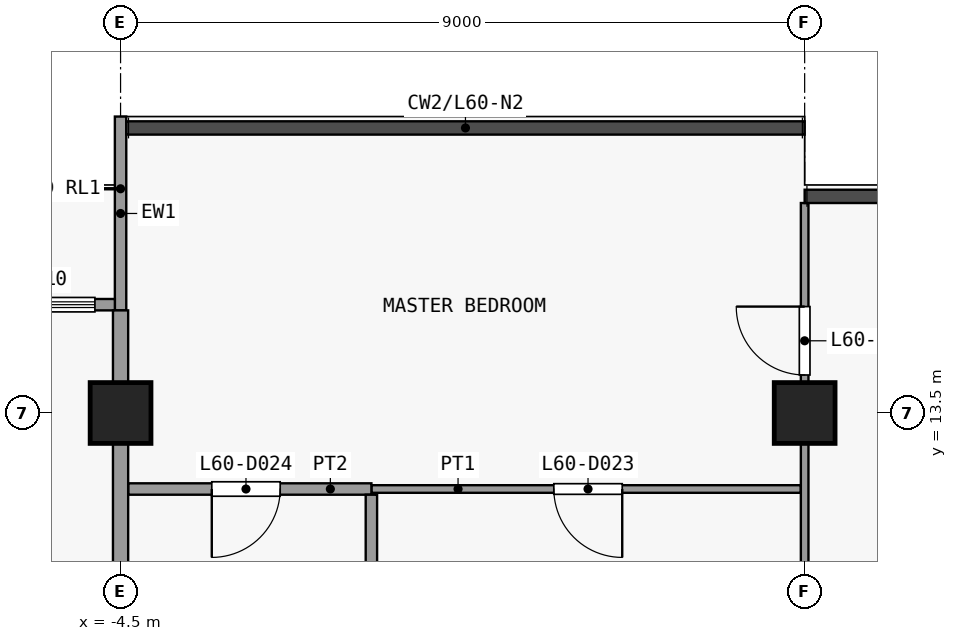
"""IFC4 building model, lengths in metres.
Left out: names, types, materials, properties, quantities, classifications, styles, units other than length and angle.
Written with IfcOpenShell. Run it as: python <this file> out.ifc"""

import sys

from ifc_helpers import new_model, si_unit, direction, frame, frame_2d, origin, origin_2d, place, context, subcontext, project, spatial, rectangle, extrude, element, fill, save


model = new_model("IFC4")
c1 = context("Model", 3, precision=1e-05, world=origin(), true_north=direction((0.0, 1.0)))
c2 = subcontext(c1, "Body", "Model", "MODEL_VIEW")
j1 = project(units=[si_unit("LENGTHUNIT", "METRE"), si_unit("PLANEANGLEUNIT", "RADIAN")], contexts=[c1])
p1 = place(None, origin())
s1 = spatial("IfcSite", under=j1, at=p1, CompositionType="ELEMENT")
p2 = place(p1, origin())
s2 = spatial("IfcBuilding", under=s1, at=p2, CompositionType="ELEMENT")
p3 = place(p2, frame((0.0, 0.0, 237.5)))
s3 = spatial("IfcBuildingStorey", under=s2, at=p3, CompositionType="ELEMENT", Elevation=237.5)
for number, where, z_axis, x_axis in (
    (1, (-4.5, 13.5, 0.0), (0.0, 0.0, 1.0), (1.0, 0.0, 0.0)),
    (2, (4.5, 13.5, 0.0), (0.0, 0.0, 1.0), (1.0, 0.0, 0.0)),
):
    element("IfcColumn", number, at=place(p3, frame(where, z_axis=z_axis, x_axis=x_axis)), inside=s3, PredefinedType="COLUMN", context=c2, shape_type="SweptSolid", body=[
        extrude(rectangle(XDim=0.8, YDim=0.8, at=origin_2d()), origin(), (0.0, 0.0, 1.0), 3.6),
    ])
p4 = place(p3, frame((-4.5, 14.85, 0.0), z_axis=(0.0, 0.0, 1.0), x_axis=(0.0, 1.0, 0.0)))
e3 = element("IfcWall", 3, at=p4, inside=s3, PredefinedType="SOLIDWALL", context=c2, shape_type="SweptSolid", body=[
    extrude(rectangle(XDim=2.55, YDim=0.15, at=frame_2d((1.275, 0.0))), origin(), (0.0, 0.0, 1.0), 3.3),
])
p5 = place(p3, frame((-10.425, 14.925, 0.0), z_axis=(0.0, 0.0, 1.0), x_axis=(1.0, 0.0, 0.0)))
e4 = element("IfcWall", 4, at=p5, inside=s3, PredefinedType="SOLIDWALL", context=c2, shape_type="SweptSolid", body=[
    extrude(rectangle(XDim=5.85, YDim=0.15, at=frame_2d((2.925, 0.0))), origin(), (0.0, 0.0, 1.0), 3.3),
])
p6 = place(p5, frame((2.325, 0.0, 0.0)))
e5 = element("IfcOpeningElement", 5, at=p6, cuts=e4, PredefinedType="OPENING", context=c2, shape_type="SweptSolid", body=[
    extrude(rectangle(XDim=1.2, YDim=2.4, at=frame_2d((0.6, 1.2))), frame((0.0, 0.085, 0.0), z_axis=(0.0, -1.0, 0.0), x_axis=(1.0, 0.0, 0.0)), (0.0, 0.0, 1.0), 0.17),
])
p7 = place(p5, frame((0.262, 0.0, 0.9)))
e6 = element("IfcOpeningElement", 6, at=p7, cuts=e4, PredefinedType="OPENING", context=c2, shape_type="SweptSolid", body=[
    extrude(rectangle(XDim=1.8, YDim=2.1, at=frame_2d((0.9, 1.05))), frame((0.0, 0.085, 0.0), z_axis=(0.0, -1.0, 0.0), x_axis=(1.0, 0.0, 0.0)), (0.0, 0.0, 1.0), 0.17),
])
p8 = place(p5, frame((3.788, 0.0, 0.9)))
e7 = element("IfcOpeningElement", 7, at=p8, cuts=e4, PredefinedType="OPENING", context=c2, shape_type="SweptSolid", body=[
    extrude(rectangle(XDim=1.8, YDim=2.1, at=frame_2d((0.9, 1.05))), frame((0.0, 0.085, 0.0), z_axis=(0.0, -1.0, 0.0), x_axis=(1.0, 0.0, 0.0)), (0.0, 0.0, 1.0), 0.17),
])
p9 = place(p3, frame((-1.2, 12.5, 0.0), z_axis=(0.0, 0.0, 1.0), x_axis=(1.0, 0.0, 0.0)))
e8 = element("IfcWall", 8, at=p9, inside=s3, PredefinedType="PARTITIONING", context=c2, shape_type="SweptSolid", body=[
    extrude(rectangle(XDim=5.65, YDim=0.1, at=frame_2d((2.825, 0.0))), origin(), (0.0, 0.0, 1.0), 3.3),
])
p10 = place(p9, frame((2.4, 0.0, 0.0)))
e9 = element("IfcOpeningElement", 9, at=p10, cuts=e8, PredefinedType="OPENING", context=c2, shape_type="SweptSolid", body=[
    extrude(rectangle(XDim=0.9, YDim=2.1, at=frame_2d((0.45, 1.05))), frame((0.0, 0.06, 0.0), z_axis=(0.0, -1.0, 0.0), x_axis=(1.0, 0.0, 0.0)), (0.0, 0.0, 1.0), 0.12),
])
p11 = place(p3, frame((-4.4, 12.5, 0.0), z_axis=(0.0, 0.0, 1.0), x_axis=(1.0, 0.0, 0.0)))
e10 = element("IfcWall", 10, at=p11, inside=s3, PredefinedType="PARTITIONING", context=c2, shape_type="SweptSolid", body=[
    extrude(rectangle(XDim=3.2, YDim=0.15, at=frame_2d((1.6, 0.0))), origin(), (0.0, 0.0, 1.0), 3.3),
])
p12 = place(p11, frame((1.1, 0.0, 0.0)))
e11 = element("IfcOpeningElement", 11, at=p12, cuts=e10, PredefinedType="OPENING", context=c2, shape_type="SweptSolid", body=[
    extrude(rectangle(XDim=0.9, YDim=2.1, at=frame_2d((0.45, 1.05))), frame((0.0, 0.085, 0.0), z_axis=(0.0, -1.0, 0.0), x_axis=(1.0, 0.0, 0.0)), (0.0, 0.0, 1.0), 0.17),
])
p13 = place(p3, frame((-4.5, 7.575, 0.0), z_axis=(0.0, 0.0, 1.0), x_axis=(0.0, 1.0, 0.0)))
e12 = element("IfcWall", 12, at=p13, inside=s3, PredefinedType="PARTITIONING", context=c2, shape_type="SweptSolid", body=[
    extrude(rectangle(XDim=7.275, YDim=0.2, at=frame_2d((3.638, 0.0))), origin(), (0.0, 0.0, 1.0), 3.3),
])
p14 = place(p3, frame((-1.2, 7.575, 0.0), z_axis=(0.0, 0.0, 1.0), x_axis=(0.0, 1.0, 0.0)))
e13 = element("IfcWall", 13, at=p14, inside=s3, PredefinedType="PARTITIONING", context=c2, shape_type="SweptSolid", body=[
    extrude(rectangle(XDim=4.85, YDim=0.15, at=frame_2d((2.425, 0.0))), origin(), (0.0, 0.0, 1.0), 3.3),
])
p15 = place(p3, frame((4.5, 7.575, 0.0), z_axis=(0.0, 0.0, 1.0), x_axis=(0.0, 1.0, 0.0)))
e14 = element("IfcWall", 14, at=p15, inside=s3, PredefinedType="PARTITIONING", context=c2, shape_type="SweptSolid", body=[
    extrude(rectangle(XDim=8.688, YDim=0.1, at=frame_2d((4.344, 0.0))), origin(), (0.0, 0.0, 1.0), 3.3),
])
p16 = place(p15, frame((6.425, 0.0, 0.0)))
e15 = element("IfcOpeningElement", 15, at=p16, cuts=e14, PredefinedType="OPENING", context=c2, shape_type="SweptSolid", body=[
    extrude(rectangle(XDim=0.9, YDim=2.1, at=frame_2d((0.45, 1.05))), frame((0.0, 0.06, 0.0), z_axis=(0.0, -1.0, 0.0), x_axis=(1.0, 0.0, 0.0)), (0.0, 0.0, 1.0), 0.12),
])
p17 = place(p8, origin())
e16 = element("IfcWindow", 16, at=p17, inside=s3, PartitioningType="SINGLE_PANEL", PredefinedType="WINDOW", context=c2, shape_type="SweptSolid", body=[
    extrude(rectangle(XDim=1.8, YDim=2.1, at=frame_2d((0.9, 1.05))), frame((0.0, 0.03, 0.0), z_axis=(0.0, -1.0, 0.0), x_axis=(1.0, 0.0, 0.0)), (0.0, 0.0, 1.0), 0.06),
])
fill(e7, e16)
p18 = place(p10, origin())
e17 = element("IfcDoor", 17, at=p18, inside=s3, OperationType="SINGLE_SWING_RIGHT", PredefinedType="DOOR", context=c2, shape_type="SweptSolid", body=[
    extrude(rectangle(XDim=0.9, YDim=2.1, at=frame_2d((0.45, 1.05))), frame((0.0, 0.025, 0.0), z_axis=(0.0, -1.0, 0.0), x_axis=(1.0, 0.0, 0.0)), (0.0, 0.0, 1.0), 0.05),
])
fill(e9, e17)
p19 = place(p12, origin())
e18 = element("IfcDoor", 18, at=p19, inside=s3, OperationType="SINGLE_SWING_LEFT", PredefinedType="DOOR", context=c2, shape_type="SweptSolid", body=[
    extrude(rectangle(XDim=0.9, YDim=2.1, at=frame_2d((0.45, 1.05))), frame((0.0, 0.025, 0.0), z_axis=(0.0, -1.0, 0.0), x_axis=(1.0, 0.0, 0.0)), (0.0, 0.0, 1.0), 0.05),
])
fill(e11, e18)
p20 = place(p16, origin())
e19 = element("IfcDoor", 19, at=p20, inside=s3, OperationType="SINGLE_SWING_LEFT", PredefinedType="DOOR", context=c2, shape_type="SweptSolid", body=[
    extrude(rectangle(XDim=0.9, YDim=2.1, at=frame_2d((0.45, 1.05))), frame((0.0, 0.025, 0.0), z_axis=(0.0, -1.0, 0.0), x_axis=(1.0, 0.0, 0.0)), (0.0, 0.0, 1.0), 0.05),
])
fill(e15, e19)
save(model, sys.argv[1])
